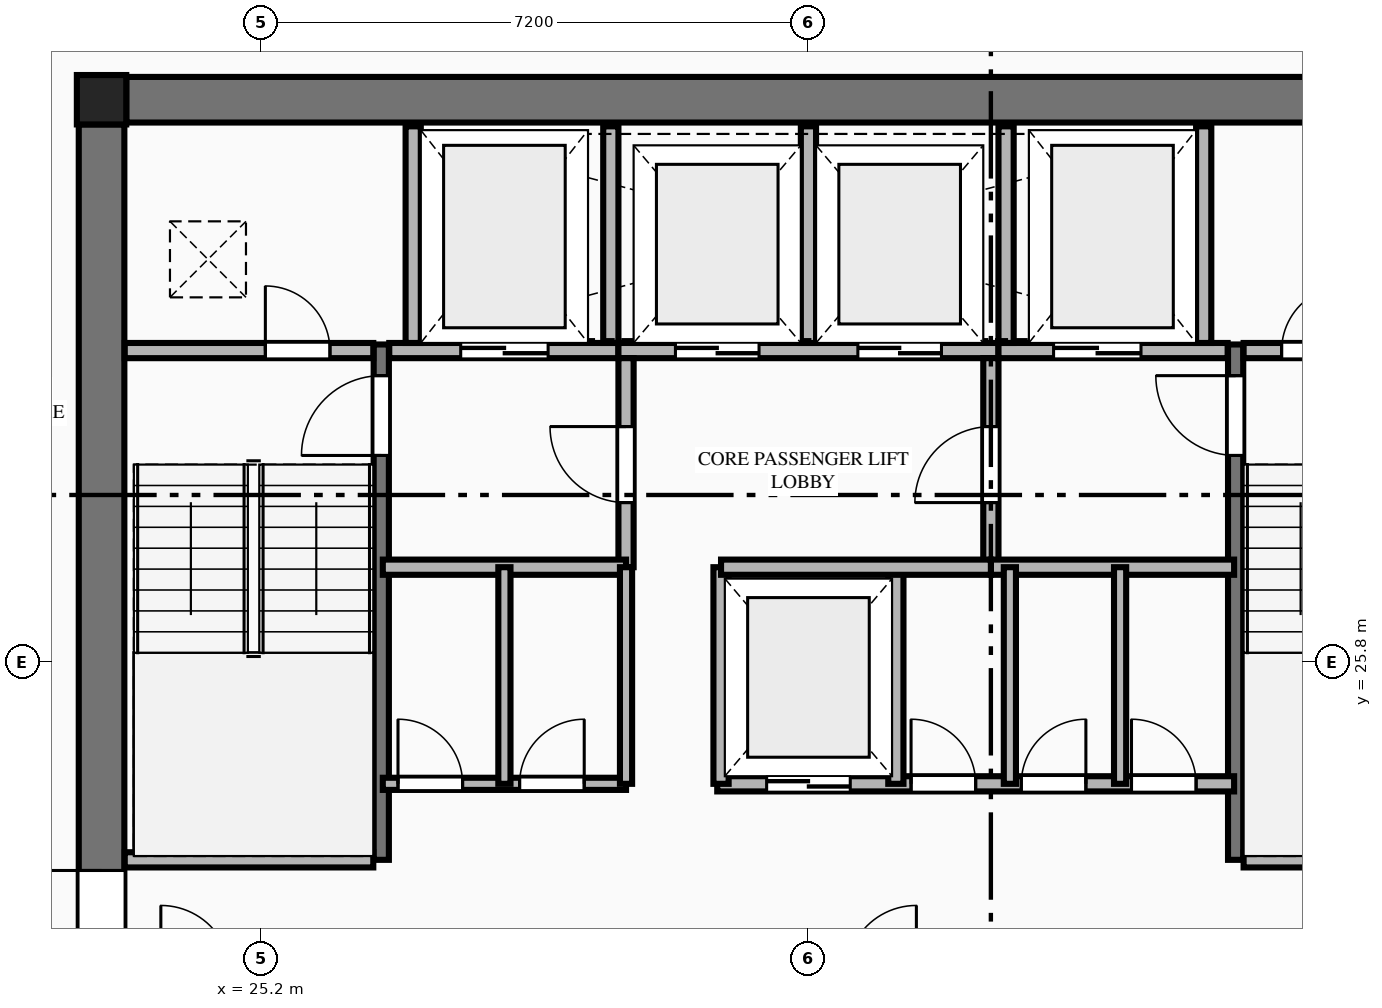
"""IFC4 building model, lengths in metres.
Left out: names, types, materials, properties, quantities, classifications, styles, units other than length and angle.
Written with IfcOpenShell. Run it as: python <this file> out.ifc"""

import sys

from ifc_helpers import new_model, si_unit, direction, frame, frame_2d, origin, origin_2d, place, context, subcontext, project, spatial, rectangle, extrude, element, fill, save


model = new_model("IFC4")
c1 = context("Model", 3, precision=1e-05, world=origin(), true_north=direction((0.0, 1.0)))
c2 = subcontext(c1, "Body", "Model", "MODEL_VIEW")
j1 = project(units=[si_unit("LENGTHUNIT", "METRE"), si_unit("PLANEANGLEUNIT", "RADIAN")], contexts=[c1])
p1 = place(None, origin())
s1 = spatial("IfcSite", under=j1, at=p1, CompositionType="ELEMENT")
p2 = place(p1, origin())
s2 = spatial("IfcBuilding", under=s1, at=p2, CompositionType="ELEMENT")
p3 = place(p2, frame((0.0, 0.0, 179.0)))
s3 = spatial("IfcBuildingStorey", under=s2, at=p3, CompositionType="ELEMENT", Elevation=179.0)
p4 = place(p3, frame((23.1, 33.2, 0.0), z_axis=(0.0, 0.0, 1.0), x_axis=(1.0, 0.0, 0.0)))
e1 = element("IfcColumn", 1, at=p4, inside=s3, PredefinedType="COLUMN", context=c2, shape_type="SweptSolid", body=[
    extrude(rectangle(XDim=0.65, YDim=0.65, at=origin_2d()), origin(), (0.0, 0.0, 1.0), 3.55),
])
p5 = place(p3, frame((23.425, 33.2, 0.0), z_axis=(0.0, 0.0, 1.0), x_axis=(1.0, 0.0, 0.0)))
e2 = element("IfcWall", 2, at=p5, inside=s3, PredefinedType="SHEAR", context=c2, shape_type="SweptSolid", body=[
    extrude(rectangle(XDim=17.95, YDim=0.6, at=frame_2d((8.975, 0.0))), origin(), (0.0, 0.0, 1.0), 3.35),
])
p6 = place(p3, frame((23.1, 18.925, 0.0), z_axis=(0.0, 0.0, 1.0), x_axis=(0.0, 1.0, 0.0)))
e3 = element("IfcWall", 3, at=p6, inside=s3, PredefinedType="SHEAR", context=c2, shape_type="SweptSolid", body=[
    extrude(rectangle(XDim=13.95, YDim=0.6, at=frame_2d((6.975, 0.0))), origin(), (0.0, 0.0, 1.0), 3.35),
])
p7 = place(p6, frame((2.915, 0.0, 0.0)))
e4 = element("IfcOpeningElement", 4, at=p7, cuts=e3, PredefinedType="OPENING", context=c2, shape_type="SweptSolid", body=[
    extrude(rectangle(XDim=1.22, YDim=2.25, at=frame_2d((0.61, 1.125))), frame((0.0, 0.31, 0.0), z_axis=(0.0, -1.0, 0.0), x_axis=(1.0, 0.0, 0.0)), (0.0, 0.0, 1.0), 0.62),
])
p8 = place(p3, frame((26.78, 23.2, 0.0), z_axis=(0.0, 0.0, 1.0), x_axis=(0.0, 1.0, 0.0)))
e5 = element("IfcWall", 5, at=p8, inside=s3, PredefinedType="SHEAR", context=c2, shape_type="SweptSolid", body=[
    extrude(rectangle(XDim=6.78, YDim=0.2, at=frame_2d((3.39, 0.0))), origin(), (0.0, 0.0, 1.0), 3.55),
])
p9 = place(p8, frame((5.32, 0.0, 0.0)))
e6 = element("IfcOpeningElement", 6, at=p9, cuts=e5, PredefinedType="OPENING", context=c2, shape_type="SweptSolid", body=[
    extrude(rectangle(XDim=1.05, YDim=2.15, at=frame_2d((0.525, 1.075))), frame((0.0, 0.11, 0.0), z_axis=(0.0, -1.0, 0.0), x_axis=(1.0, 0.0, 0.0)), (0.0, 0.0, 1.0), 0.22),
])
p10 = place(p3, frame((23.405, 23.2, 0.0), z_axis=(0.0, 0.0, 1.0), x_axis=(1.0, 0.0, 0.0)))
e7 = element("IfcWall", 7, at=p10, inside=s3, PredefinedType="PLUMBINGWALL", context=c2, shape_type="SweptSolid", body=[
    extrude(rectangle(XDim=3.27, YDim=0.2, at=frame_2d((1.635, 0.0))), origin(), (0.0, 0.0, 1.0), 3.35),
])
p11 = place(p3, frame((38.02, 23.2, 0.0), z_axis=(0.0, 0.0, 1.0), x_axis=(0.0, 1.0, 0.0)))
e8 = element("IfcWall", 8, at=p11, inside=s3, PredefinedType="SHEAR", context=c2, shape_type="SweptSolid", body=[
    extrude(rectangle(XDim=6.78, YDim=0.2, at=frame_2d((3.39, 0.0))), origin(), (0.0, 0.0, 1.0), 3.55),
])
p12 = place(p11, frame((5.32, 0.0, 0.0)))
e9 = element("IfcOpeningElement", 9, at=p12, cuts=e8, PredefinedType="OPENING", context=c2, shape_type="SweptSolid", body=[
    extrude(rectangle(XDim=1.05, YDim=2.15, at=frame_2d((0.525, 1.075))), frame((0.0, 0.11, 0.0), z_axis=(0.0, -1.0, 0.0), x_axis=(1.0, 0.0, 0.0)), (0.0, 0.0, 1.0), 0.22),
])
p13 = place(p3, frame((38.125, 23.2, 0.0), z_axis=(0.0, 0.0, 1.0), x_axis=(1.0, 0.0, 0.0)))
e10 = element("IfcWall", 10, at=p13, inside=s3, PredefinedType="PLUMBINGWALL", context=c2, shape_type="SweptSolid", body=[
    extrude(rectangle(XDim=3.27, YDim=0.2, at=frame_2d((1.635, 0.0))), origin(), (0.0, 0.0, 1.0), 3.35),
])
p14 = place(p3, frame((23.405, 29.9, 0.0), z_axis=(0.0, 0.0, 1.0), x_axis=(1.0, 0.0, 0.0)))
e11 = element("IfcWall", 11, at=p14, inside=s3, PredefinedType="PLUMBINGWALL", context=c2, shape_type="SweptSolid", body=[
    extrude(rectangle(XDim=3.27, YDim=0.2, at=frame_2d((1.635, 0.0))), origin(), (0.0, 0.0, 1.0), 3.35),
])
p15 = place(p14, frame((1.85, 0.0, 0.0)))
e12 = element("IfcOpeningElement", 12, at=p15, cuts=e11, PredefinedType="OPENING", context=c2, shape_type="SweptSolid", body=[
    extrude(rectangle(XDim=0.85, YDim=2.05, at=frame_2d((0.425, 1.025))), frame((0.0, 0.11, 0.0), z_axis=(0.0, -1.0, 0.0), x_axis=(1.0, 0.0, 0.0)), (0.0, 0.0, 1.0), 0.22),
])
p16 = place(p3, frame((26.885, 29.9, 0.0), z_axis=(0.0, 0.0, 1.0), x_axis=(1.0, 0.0, 0.0)))
e13 = element("IfcWall", 13, at=p16, inside=s3, PredefinedType="PLUMBINGWALL", context=c2, shape_type="SweptSolid", body=[
    extrude(rectangle(XDim=3.015, YDim=0.2, at=frame_2d((1.507, 0.0))), origin(), (0.0, 0.0, 1.0), 3.35),
])
p17 = place(p16, frame((0.94, 0.0, 0.0)))
e14 = element("IfcOpeningElement", 14, at=p17, cuts=e13, PredefinedType="OPENING", context=c2, shape_type="SweptSolid", body=[
    extrude(rectangle(XDim=1.15, YDim=2.2, at=frame_2d((0.575, 1.1))), frame((0.0, 0.11, 0.0), z_axis=(0.0, -1.0, 0.0), x_axis=(1.0, 0.0, 0.0)), (0.0, 0.0, 1.0), 0.22),
])
p18 = place(p3, frame((29.9, 29.9, 0.0), z_axis=(0.0, 0.0, 1.0), x_axis=(1.0, 0.0, 0.0)))
e15 = element("IfcWall", 15, at=p18, inside=s3, PredefinedType="PLUMBINGWALL", context=c2, shape_type="SweptSolid", body=[
    extrude(rectangle(XDim=5.0, YDim=0.2, at=frame_2d((2.5, 0.0))), origin(), (0.0, 0.0, 1.0), 3.35),
])
p19 = place(p18, frame((0.75, 0.0, 0.0)))
e16 = element("IfcOpeningElement", 16, at=p19, cuts=e15, PredefinedType="OPENING", context=c2, shape_type="SweptSolid", body=[
    extrude(rectangle(XDim=1.1, YDim=2.2, at=frame_2d((0.55, 1.1))), frame((0.0, 0.11, 0.0), z_axis=(0.0, -1.0, 0.0), x_axis=(1.0, 0.0, 0.0)), (0.0, 0.0, 1.0), 0.22),
])
p20 = place(p18, frame((3.15, 0.0, 0.0)))
e17 = element("IfcOpeningElement", 17, at=p20, cuts=e15, PredefinedType="OPENING", context=c2, shape_type="SweptSolid", body=[
    extrude(rectangle(XDim=1.1, YDim=2.2, at=frame_2d((0.55, 1.1))), frame((0.0, 0.11, 0.0), z_axis=(0.0, -1.0, 0.0), x_axis=(1.0, 0.0, 0.0)), (0.0, 0.0, 1.0), 0.22),
])
p21 = place(p3, frame((34.9, 29.9, 0.0), z_axis=(0.0, 0.0, 1.0), x_axis=(1.0, 0.0, 0.0)))
e18 = element("IfcWall", 18, at=p21, inside=s3, PredefinedType="PLUMBINGWALL", context=c2, shape_type="SweptSolid", body=[
    extrude(rectangle(XDim=3.015, YDim=0.2, at=frame_2d((1.508, 0.0))), origin(), (0.0, 0.0, 1.0), 3.35),
])
p22 = place(p21, frame((0.725, 0.0, 0.0)))
e19 = element("IfcOpeningElement", 19, at=p22, cuts=e18, PredefinedType="OPENING", context=c2, shape_type="SweptSolid", body=[
    extrude(rectangle(XDim=1.15, YDim=2.2, at=frame_2d((0.575, 1.1))), frame((0.0, 0.11, 0.0), z_axis=(0.0, -1.0, 0.0), x_axis=(1.0, 0.0, 0.0)), (0.0, 0.0, 1.0), 0.22),
])
p23 = place(p3, frame((38.125, 29.9, 0.0), z_axis=(0.0, 0.0, 1.0), x_axis=(1.0, 0.0, 0.0)))
e20 = element("IfcWall", 20, at=p23, inside=s3, PredefinedType="PLUMBINGWALL", context=c2, shape_type="SweptSolid", body=[
    extrude(rectangle(XDim=3.27, YDim=0.2, at=frame_2d((1.635, 0.0))), origin(), (0.0, 0.0, 1.0), 3.35),
])
p24 = place(p23, frame((0.5, 0.0, 0.0)))
e21 = element("IfcOpeningElement", 21, at=p24, cuts=e20, PredefinedType="OPENING", context=c2, shape_type="SweptSolid", body=[
    extrude(rectangle(XDim=0.85, YDim=2.05, at=frame_2d((0.425, 1.025))), frame((0.0, 0.11, 0.0), z_axis=(0.0, -1.0, 0.0), x_axis=(1.0, 0.0, 0.0)), (0.0, 0.0, 1.0), 0.22),
])
for number, where, z_axis, x_axis in (
    (22, (27.2, 30.0, 0.0), (0.0, 0.0, 1.0), (0.0, 1.0, 0.0)),
    (23, (29.8, 30.0, 0.0), (0.0, 0.0, 1.0), (0.0, 1.0, 0.0)),
    (24, (32.4, 30.0, 0.0), (0.0, 0.0, 1.0), (0.0, 1.0, 0.0)),
    (25, (35.0, 30.0, 0.0), (0.0, 0.0, 1.0), (0.0, 1.0, 0.0)),
    (26, (37.6, 30.0, 0.0), (0.0, 0.0, 1.0), (0.0, 1.0, 0.0)),
):
    element("IfcWall", number, at=place(p3, frame(where, z_axis=z_axis, x_axis=x_axis)), inside=s3, PredefinedType="PLUMBINGWALL", context=c2, shape_type="SweptSolid", body=[
        extrude(rectangle(XDim=2.85, YDim=0.2, at=frame_2d((1.425, 0.0))), origin(), (0.0, 0.0, 1.0), 3.35),
    ])
p25 = place(p3, frame((30.0, 27.05, 0.0), z_axis=(0.0, 0.0, 1.0), x_axis=(0.0, 1.0, 0.0)))
e27 = element("IfcWall", 27, at=p25, inside=s3, PredefinedType="PLUMBINGWALL", context=c2, shape_type="SweptSolid", body=[
    extrude(rectangle(XDim=2.75, YDim=0.2, at=frame_2d((1.375, 0.0))), origin(), (0.0, 0.0, 1.0), 3.35),
])
p26 = place(p25, frame((0.85, 0.0, 0.0)))
e28 = element("IfcOpeningElement", 28, at=p26, cuts=e27, PredefinedType="OPENING", context=c2, shape_type="SweptSolid", body=[
    extrude(rectangle(XDim=1.0, YDim=2.15, at=frame_2d((0.5, 1.075))), frame((0.0, 0.11, 0.0), z_axis=(0.0, -1.0, 0.0), x_axis=(1.0, 0.0, 0.0)), (0.0, 0.0, 1.0), 0.22),
])
p27 = place(p3, frame((26.8, 27.05, 0.0), z_axis=(0.0, 0.0, 1.0), x_axis=(1.0, 0.0, 0.0)))
e29 = element("IfcWall", 29, at=p27, inside=s3, PredefinedType="PLUMBINGWALL", context=c2, shape_type="SweptSolid", body=[
    extrude(rectangle(XDim=3.2, YDim=0.2, at=frame_2d((1.6, 0.0))), origin(), (0.0, 0.0, 1.0), 3.35),
])
p28 = place(p3, frame((34.8, 27.05, 0.0), z_axis=(0.0, 0.0, 1.0), x_axis=(0.0, 1.0, 0.0)))
e30 = element("IfcWall", 30, at=p28, inside=s3, PredefinedType="PLUMBINGWALL", context=c2, shape_type="SweptSolid", body=[
    extrude(rectangle(XDim=2.75, YDim=0.2, at=frame_2d((1.375, 0.0))), origin(), (0.0, 0.0, 1.0), 3.35),
])
p29 = place(p28, frame((0.85, 0.0, 0.0)))
e31 = element("IfcOpeningElement", 31, at=p29, cuts=e30, PredefinedType="OPENING", context=c2, shape_type="SweptSolid", body=[
    extrude(rectangle(XDim=1.0, YDim=2.15, at=frame_2d((0.5, 1.075))), frame((0.0, 0.11, 0.0), z_axis=(0.0, -1.0, 0.0), x_axis=(1.0, 0.0, 0.0)), (0.0, 0.0, 1.0), 0.22),
])
p30 = place(p3, frame((34.8, 27.05, 0.0), z_axis=(0.0, 0.0, 1.0), x_axis=(1.0, 0.0, 0.0)))
e32 = element("IfcWall", 32, at=p30, inside=s3, PredefinedType="PLUMBINGWALL", context=c2, shape_type="SweptSolid", body=[
    extrude(rectangle(XDim=3.2, YDim=0.2, at=frame_2d((1.6, 0.0))), origin(), (0.0, 0.0, 1.0), 3.35),
])
p31 = place(p3, frame((26.8, 24.2, 0.0), z_axis=(0.0, 0.0, 1.0), x_axis=(1.0, 0.0, 0.0)))
e33 = element("IfcWall", 33, at=p31, inside=s3, PredefinedType="PARTITIONING", context=c2, shape_type="SweptSolid", body=[
    extrude(rectangle(XDim=3.2, YDim=0.16, at=frame_2d((1.6, 0.0))), origin(), (0.0, 0.0, 1.0), 3.35),
])
p32 = place(p31, frame((0.2, 0.0, 0.0)))
e34 = element("IfcOpeningElement", 34, at=p32, cuts=e33, PredefinedType="OPENING", context=c2, shape_type="SweptSolid", body=[
    extrude(rectangle(XDim=0.85, YDim=2.05, at=frame_2d((0.425, 1.025))), frame((0.0, 0.09, 0.0), z_axis=(0.0, -1.0, 0.0), x_axis=(1.0, 0.0, 0.0)), (0.0, 0.0, 1.0), 0.18),
])
p33 = place(p31, frame((1.8, 0.0, 0.0)))
e35 = element("IfcOpeningElement", 35, at=p33, cuts=e33, PredefinedType="OPENING", context=c2, shape_type="SweptSolid", body=[
    extrude(rectangle(XDim=0.85, YDim=2.05, at=frame_2d((0.425, 1.025))), frame((0.0, 0.09, 0.0), z_axis=(0.0, -1.0, 0.0), x_axis=(1.0, 0.0, 0.0)), (0.0, 0.0, 1.0), 0.18),
])
p34 = place(p3, frame((30.0, 24.2, 0.0), z_axis=(0.0, 0.0, 1.0), x_axis=(0.0, 1.0, 0.0)))
e36 = element("IfcWall", 36, at=p34, inside=s3, PredefinedType="PARTITIONING", context=c2, shape_type="SweptSolid", body=[
    extrude(rectangle(XDim=2.85, YDim=0.16, at=frame_2d((1.425, 0.0))), origin(), (0.0, 0.0, 1.0), 3.35),
])
p35 = place(p3, frame((31.2, 24.2, 0.0), z_axis=(0.0, 0.0, 1.0), x_axis=(1.0, 0.0, 0.0)))
e37 = element("IfcWall", 37, at=p35, inside=s3, PredefinedType="PLUMBINGWALL", context=c2, shape_type="SweptSolid", body=[
    extrude(rectangle(XDim=6.8, YDim=0.2, at=frame_2d((3.4, 0.0))), origin(), (0.0, 0.0, 1.0), 3.35),
])
p36 = place(p35, frame((0.65, 0.0, 0.0)))
e38 = element("IfcOpeningElement", 38, at=p36, cuts=e37, PredefinedType="OPENING", context=c2, shape_type="SweptSolid", body=[
    extrude(rectangle(XDim=1.1, YDim=2.2, at=frame_2d((0.55, 1.1))), frame((0.0, 0.11, 0.0), z_axis=(0.0, -1.0, 0.0), x_axis=(1.0, 0.0, 0.0)), (0.0, 0.0, 1.0), 0.22),
])
p37 = place(p35, frame((2.55, 0.0, 0.0)))
e39 = element("IfcOpeningElement", 39, at=p37, cuts=e37, PredefinedType="OPENING", context=c2, shape_type="SweptSolid", body=[
    extrude(rectangle(XDim=0.85, YDim=2.05, at=frame_2d((0.425, 1.025))), frame((0.0, 0.11, 0.0), z_axis=(0.0, -1.0, 0.0), x_axis=(1.0, 0.0, 0.0)), (0.0, 0.0, 1.0), 0.22),
])
p38 = place(p35, frame((4.0, 0.0, 0.0)))
e40 = element("IfcOpeningElement", 40, at=p38, cuts=e37, PredefinedType="OPENING", context=c2, shape_type="SweptSolid", body=[
    extrude(rectangle(XDim=0.85, YDim=2.05, at=frame_2d((0.425, 1.025))), frame((0.0, 0.11, 0.0), z_axis=(0.0, -1.0, 0.0), x_axis=(1.0, 0.0, 0.0)), (0.0, 0.0, 1.0), 0.22),
])
p39 = place(p35, frame((5.45, 0.0, 0.0)))
e41 = element("IfcOpeningElement", 41, at=p39, cuts=e37, PredefinedType="OPENING", context=c2, shape_type="SweptSolid", body=[
    extrude(rectangle(XDim=0.85, YDim=2.05, at=frame_2d((0.425, 1.025))), frame((0.0, 0.11, 0.0), z_axis=(0.0, -1.0, 0.0), x_axis=(1.0, 0.0, 0.0)), (0.0, 0.0, 1.0), 0.22),
])
for number, where, z_axis, x_axis in (
    (42, (31.25, 24.2, 0.0), (0.0, 0.0, 1.0), (0.0, 1.0, 0.0)),
    (43, (33.55, 24.2, 0.0), (0.0, 0.0, 1.0), (0.0, 1.0, 0.0)),
):
    element("IfcWall", number, at=place(p3, frame(where, z_axis=z_axis, x_axis=x_axis)), inside=s3, PredefinedType="PLUMBINGWALL", context=c2, shape_type="SweptSolid", body=[
        extrude(rectangle(XDim=2.85, YDim=0.2, at=frame_2d((1.425, 0.0))), origin(), (0.0, 0.0, 1.0), 3.35),
    ])
p40 = place(p3, frame((31.25, 27.05, 0.0), z_axis=(0.0, 0.0, 1.0), x_axis=(1.0, 0.0, 0.0)))
e44 = element("IfcWall", 44, at=p40, inside=s3, PredefinedType="PLUMBINGWALL", context=c2, shape_type="SweptSolid", body=[
    extrude(rectangle(XDim=3.55, YDim=0.2, at=frame_2d((1.775, 0.0))), origin(), (0.0, 0.0, 1.0), 3.35),
])
for number, where, z_axis, x_axis in (
    (45, (28.4, 24.2, 0.0), (0.0, 0.0, 1.0), (0.0, 1.0, 0.0)),
    (46, (35.05, 24.2, 0.0), (0.0, 0.0, 1.0), (0.0, 1.0, 0.0)),
    (47, (36.5, 24.2, 0.0), (0.0, 0.0, 1.0), (0.0, 1.0, 0.0)),
):
    element("IfcWall", number, at=place(p3, frame(where, z_axis=z_axis, x_axis=x_axis)), inside=s3, PredefinedType="PARTITIONING", context=c2, shape_type="SweptSolid", body=[
        extrude(rectangle(XDim=2.85, YDim=0.16, at=frame_2d((1.425, 0.0))), origin(), (0.0, 0.0, 1.0), 3.35),
    ])
p41 = place(p7, origin())
e48 = element("IfcDoor", 48, at=p41, inside=s3, OperationType="SINGLE_SWING_RIGHT", PredefinedType="DOOR", context=c2, shape_type="SweptSolid", body=[
    extrude(rectangle(XDim=1.22, YDim=2.25, at=frame_2d((0.61, 1.125))), frame((0.0, 0.025, 0.0), z_axis=(0.0, -1.0, 0.0), x_axis=(1.0, 0.0, 0.0)), (0.0, 0.0, 1.0), 0.05),
])
fill(e4, e48)
p42 = place(p9, origin())
e49 = element("IfcDoor", 49, at=p42, inside=s3, OperationType="SINGLE_SWING_LEFT", PredefinedType="DOOR", context=c2, shape_type="SweptSolid", body=[
    extrude(rectangle(XDim=1.05, YDim=2.15, at=frame_2d((0.525, 1.075))), frame((0.0, 0.025, 0.0), z_axis=(0.0, -1.0, 0.0), x_axis=(1.0, 0.0, 0.0)), (0.0, 0.0, 1.0), 0.05),
])
fill(e6, e49)
p43 = place(p12, origin())
e50 = element("IfcDoor", 50, at=p43, inside=s3, OperationType="SINGLE_SWING_RIGHT", PredefinedType="DOOR", context=c2, shape_type="SweptSolid", body=[
    extrude(rectangle(XDim=1.05, YDim=2.15, at=frame_2d((0.525, 1.075))), frame((0.0, 0.025, 0.0), z_axis=(0.0, -1.0, 0.0), x_axis=(1.0, 0.0, 0.0)), (0.0, 0.0, 1.0), 0.05),
])
fill(e9, e50)
p44 = place(p15, origin())
e51 = element("IfcDoor", 51, at=p44, inside=s3, OperationType="SINGLE_SWING_LEFT", PredefinedType="DOOR", context=c2, shape_type="SweptSolid", body=[
    extrude(rectangle(XDim=0.85, YDim=2.05, at=frame_2d((0.425, 1.025))), frame((0.0, 0.025, 0.0), z_axis=(0.0, -1.0, 0.0), x_axis=(1.0, 0.0, 0.0)), (0.0, 0.0, 1.0), 0.05),
])
fill(e12, e51)
p45 = place(p24, origin())
e52 = element("IfcDoor", 52, at=p45, inside=s3, OperationType="SINGLE_SWING_RIGHT", PredefinedType="DOOR", context=c2, shape_type="SweptSolid", body=[
    extrude(rectangle(XDim=0.85, YDim=2.05, at=frame_2d((0.425, 1.025))), frame((0.0, 0.025, 0.0), z_axis=(0.0, -1.0, 0.0), x_axis=(1.0, 0.0, 0.0)), (0.0, 0.0, 1.0), 0.05),
])
fill(e21, e52)
p46 = place(p17, origin())
e53 = element("IfcDoor", 53, at=p46, inside=s3, OperationType="DOUBLE_DOOR_SLIDING", PredefinedType="DOOR", context=c2, shape_type="SweptSolid", body=[
    extrude(rectangle(XDim=1.15, YDim=2.2, at=frame_2d((0.575, 1.1))), frame((0.0, 0.025, 0.0), z_axis=(0.0, -1.0, 0.0), x_axis=(1.0, 0.0, 0.0)), (0.0, 0.0, 1.0), 0.05),
])
fill(e14, e53)
p47 = place(p22, origin())
e54 = element("IfcDoor", 54, at=p47, inside=s3, OperationType="DOUBLE_DOOR_SLIDING", PredefinedType="DOOR", context=c2, shape_type="SweptSolid", body=[
    extrude(rectangle(XDim=1.15, YDim=2.2, at=frame_2d((0.575, 1.1))), frame((0.0, 0.025, 0.0), z_axis=(0.0, -1.0, 0.0), x_axis=(1.0, 0.0, 0.0)), (0.0, 0.0, 1.0), 0.05),
])
fill(e19, e54)
p48 = place(p19, origin())
e55 = element("IfcDoor", 55, at=p48, inside=s3, OperationType="DOUBLE_DOOR_SLIDING", PredefinedType="DOOR", context=c2, shape_type="SweptSolid", body=[
    extrude(rectangle(XDim=1.1, YDim=2.2, at=frame_2d((0.55, 1.1))), frame((0.0, 0.025, 0.0), z_axis=(0.0, -1.0, 0.0), x_axis=(1.0, 0.0, 0.0)), (0.0, 0.0, 1.0), 0.05),
])
fill(e16, e55)
p49 = place(p20, origin())
e56 = element("IfcDoor", 56, at=p49, inside=s3, OperationType="DOUBLE_DOOR_SLIDING", PredefinedType="DOOR", context=c2, shape_type="SweptSolid", body=[
    extrude(rectangle(XDim=1.1, YDim=2.2, at=frame_2d((0.55, 1.1))), frame((0.0, 0.025, 0.0), z_axis=(0.0, -1.0, 0.0), x_axis=(1.0, 0.0, 0.0)), (0.0, 0.0, 1.0), 0.05),
])
fill(e17, e56)
p50 = place(p26, origin())
e57 = element("IfcDoor", 57, at=p50, inside=s3, OperationType="SINGLE_SWING_RIGHT", PredefinedType="DOOR", context=c2, shape_type="SweptSolid", body=[
    extrude(rectangle(XDim=1.0, YDim=2.15, at=frame_2d((0.5, 1.075))), frame((0.0, 0.025, 0.0), z_axis=(0.0, -1.0, 0.0), x_axis=(1.0, 0.0, 0.0)), (0.0, 0.0, 1.0), 0.05),
])
fill(e28, e57)
p51 = place(p29, origin())
e58 = element("IfcDoor", 58, at=p51, inside=s3, OperationType="SINGLE_SWING_LEFT", PredefinedType="DOOR", context=c2, shape_type="SweptSolid", body=[
    extrude(rectangle(XDim=1.0, YDim=2.15, at=frame_2d((0.5, 1.075))), frame((0.0, 0.025, 0.0), z_axis=(0.0, -1.0, 0.0), x_axis=(1.0, 0.0, 0.0)), (0.0, 0.0, 1.0), 0.05),
])
fill(e31, e58)
p52 = place(p36, origin())
e59 = element("IfcDoor", 59, at=p52, inside=s3, OperationType="DOUBLE_DOOR_SLIDING", PredefinedType="DOOR", context=c2, shape_type="SweptSolid", body=[
    extrude(rectangle(XDim=1.1, YDim=2.2, at=frame_2d((0.55, 1.1))), frame((0.0, 0.025, 0.0), z_axis=(0.0, -1.0, 0.0), x_axis=(1.0, 0.0, 0.0)), (0.0, 0.0, 1.0), 0.05),
])
fill(e38, e59)
p53 = place(p32, origin())
e60 = element("IfcDoor", 60, at=p53, inside=s3, OperationType="SINGLE_SWING_LEFT", PredefinedType="DOOR", context=c2, shape_type="SweptSolid", body=[
    extrude(rectangle(XDim=0.85, YDim=2.05, at=frame_2d((0.425, 1.025))), frame((0.0, 0.025, 0.0), z_axis=(0.0, -1.0, 0.0), x_axis=(1.0, 0.0, 0.0)), (0.0, 0.0, 1.0), 0.05),
])
fill(e34, e60)
p54 = place(p33, origin())
e61 = element("IfcDoor", 61, at=p54, inside=s3, OperationType="SINGLE_SWING_RIGHT", PredefinedType="DOOR", context=c2, shape_type="SweptSolid", body=[
    extrude(rectangle(XDim=0.85, YDim=2.05, at=frame_2d((0.425, 1.025))), frame((0.0, 0.025, 0.0), z_axis=(0.0, -1.0, 0.0), x_axis=(1.0, 0.0, 0.0)), (0.0, 0.0, 1.0), 0.05),
])
fill(e35, e61)
p55 = place(p37, origin())
e62 = element("IfcDoor", 62, at=p55, inside=s3, OperationType="SINGLE_SWING_LEFT", PredefinedType="DOOR", context=c2, shape_type="SweptSolid", body=[
    extrude(rectangle(XDim=0.85, YDim=2.05, at=frame_2d((0.425, 1.025))), frame((0.0, 0.025, 0.0), z_axis=(0.0, -1.0, 0.0), x_axis=(1.0, 0.0, 0.0)), (0.0, 0.0, 1.0), 0.05),
])
fill(e39, e62)
p56 = place(p38, origin())
e63 = element("IfcDoor", 63, at=p56, inside=s3, OperationType="SINGLE_SWING_RIGHT", PredefinedType="DOOR", context=c2, shape_type="SweptSolid", body=[
    extrude(rectangle(XDim=0.85, YDim=2.05, at=frame_2d((0.425, 1.025))), frame((0.0, 0.025, 0.0), z_axis=(0.0, -1.0, 0.0), x_axis=(1.0, 0.0, 0.0)), (0.0, 0.0, 1.0), 0.05),
])
fill(e40, e63)
p57 = place(p39, origin())
e64 = element("IfcDoor", 64, at=p57, inside=s3, OperationType="SINGLE_SWING_LEFT", PredefinedType="DOOR", context=c2, shape_type="SweptSolid", body=[
    extrude(rectangle(XDim=0.85, YDim=2.05, at=frame_2d((0.425, 1.025))), frame((0.0, 0.025, 0.0), z_axis=(0.0, -1.0, 0.0), x_axis=(1.0, 0.0, 0.0)), (0.0, 0.0, 1.0), 0.05),
])
fill(e41, e64)
save(model, sys.argv[1])
